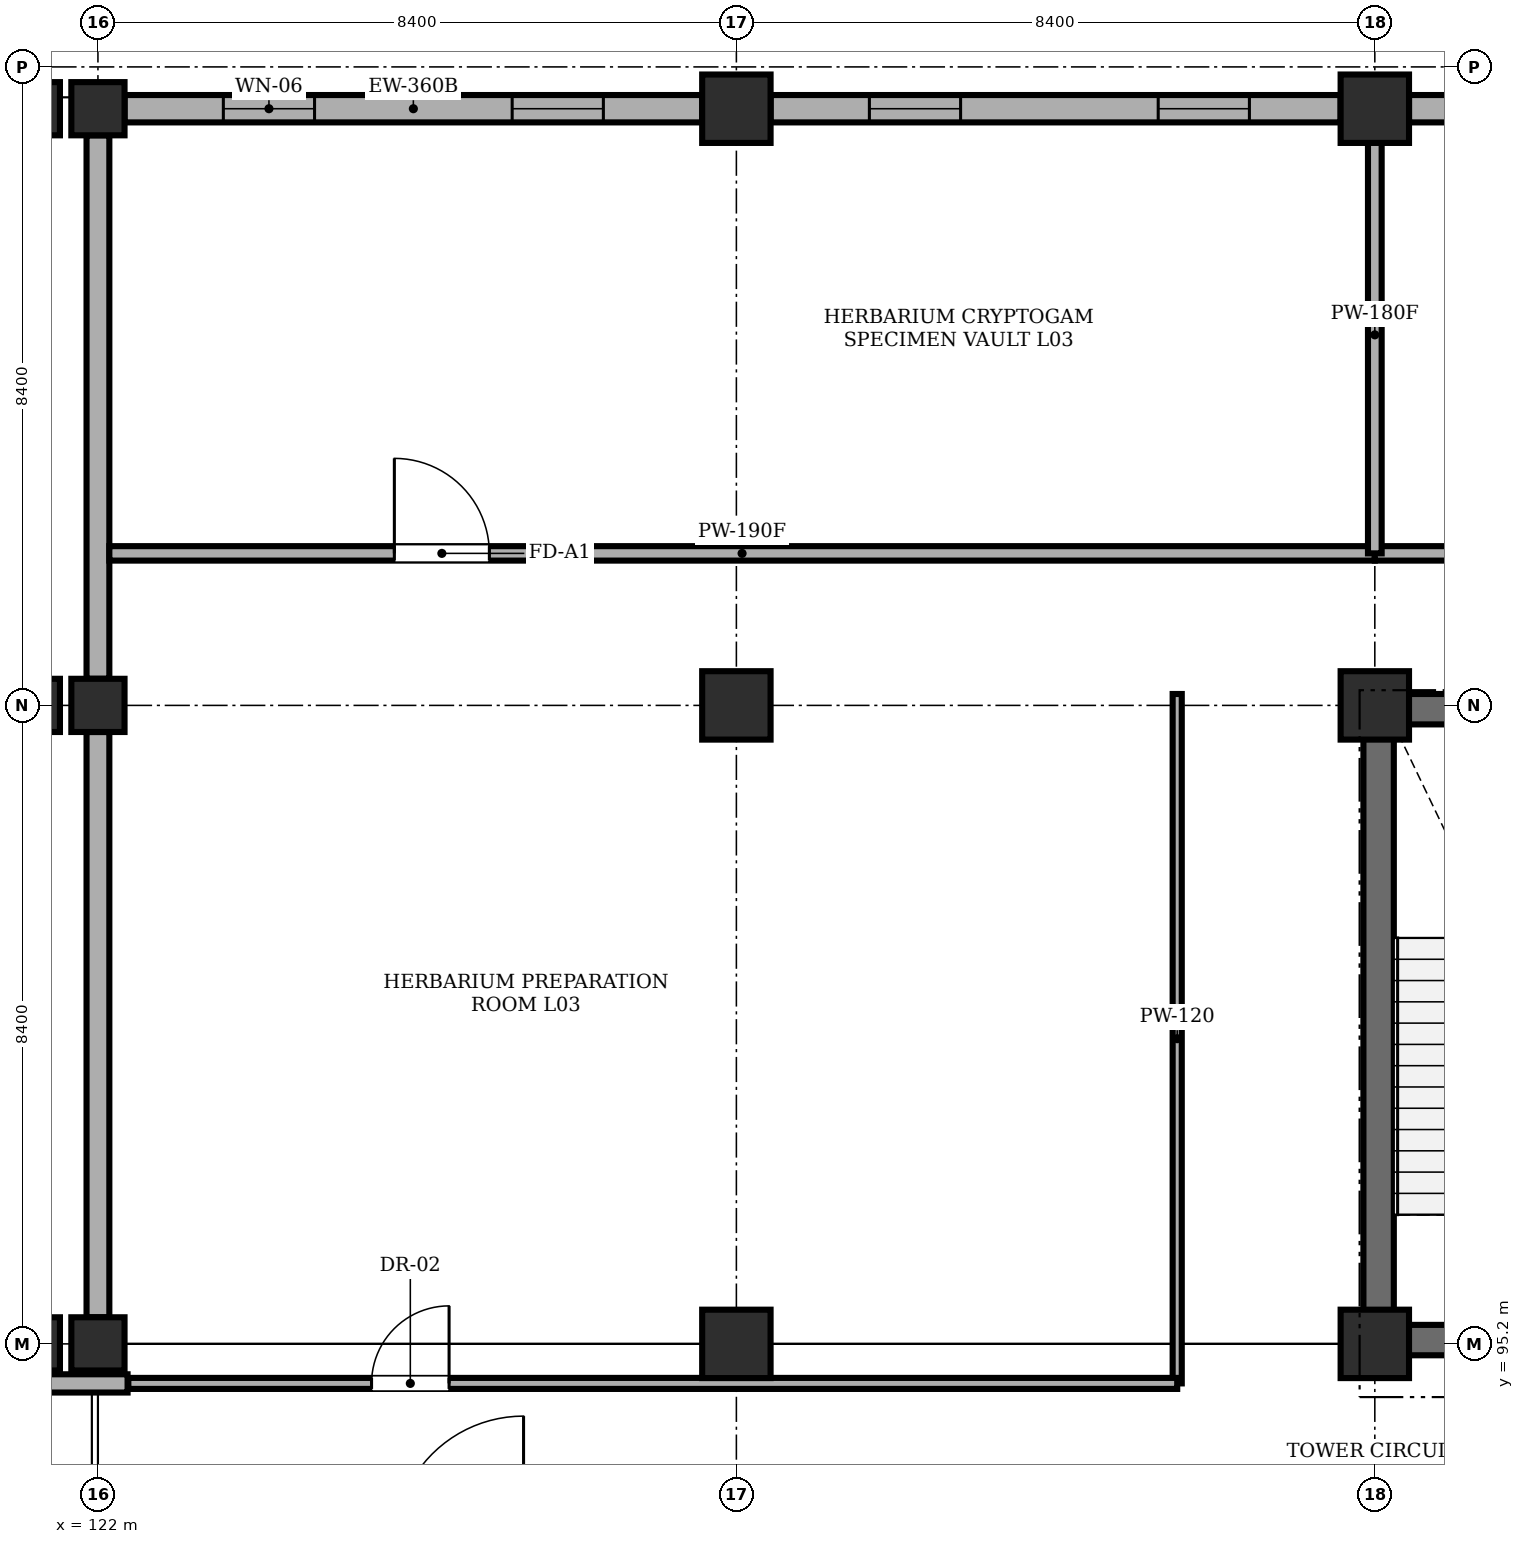
"""IFC4 building model, lengths in metres.
Left out: names, types, materials, properties, quantities, classifications, styles, units other than length and angle.
Written with IfcOpenShell. Run it as: python <this file> out.ifc"""

import sys

from ifc_helpers import new_model, si_unit, direction, frame, frame_2d, origin, origin_2d, place, context, subcontext, project, spatial, rectangle, extrude, element, fill, save


model = new_model("IFC4")
c1 = context("Model", 3, precision=1e-05, world=origin(), true_north=direction((0.0, 1.0)))
c2 = subcontext(c1, "Body", "Model", "MODEL_VIEW")
j1 = project(units=[si_unit("LENGTHUNIT", "METRE"), si_unit("PLANEANGLEUNIT", "RADIAN")], contexts=[c1])
p1 = place(None, origin())
s1 = spatial("IfcSite", under=j1, at=p1, CompositionType="ELEMENT")
p2 = place(p1, origin())
s2 = spatial("IfcBuilding", under=s1, at=p2, CompositionType="ELEMENT")
p3 = place(p2, frame((0.0, 0.0, 10.2)))
s3 = spatial("IfcBuildingStorey", under=s2, at=p3, CompositionType="ELEMENT", Elevation=10.2)
for number, where, z_axis, x_axis in (
    (1, (121.15, 95.2, 0.0), (0.0, 0.0, 1.0), (1.0, 0.0, 0.0)),
    (2, (121.15, 103.6, 0.0), (0.0, 0.0, 1.0), (1.0, 0.0, 0.0)),
    (3, (121.15, 111.45, 0.0), (0.0, 0.0, 1.0), (1.0, 0.0, 0.0)),
    (4, (122.0, 95.2, 0.0), (0.0, 0.0, 1.0), (1.0, 0.0, 0.0)),
    (5, (122.0, 103.6, 0.0), (0.0, 0.0, 1.0), (1.0, 0.0, 0.0)),
    (6, (122.0, 111.45, 0.0), (0.0, 0.0, 1.0), (1.0, 0.0, 0.0)),
):
    element("IfcColumn", number, at=place(p3, frame(where, z_axis=z_axis, x_axis=x_axis)), inside=s3, PredefinedType="COLUMN", context=c2, shape_type="SweptSolid", body=[
        extrude(rectangle(XDim=0.7, YDim=0.7, at=origin_2d()), origin(), (0.0, 0.0, 1.0), 4.26),
    ])
for number, where, z_axis, x_axis in (
    (7, (130.4, 95.2, 0.0), (0.0, 0.0, 1.0), (1.0, 0.0, 0.0)),
    (8, (130.4, 103.6, 0.0), (0.0, 0.0, 1.0), (1.0, 0.0, 0.0)),
    (9, (130.4, 111.45, 0.0), (0.0, 0.0, 1.0), (1.0, 0.0, 0.0)),
    (10, (138.8, 95.2, 0.0), (0.0, 0.0, 1.0), (1.0, 0.0, 0.0)),
    (11, (138.8, 103.6, 0.0), (0.0, 0.0, 1.0), (1.0, 0.0, 0.0)),
    (12, (138.8, 111.45, 0.0), (0.0, 0.0, 1.0), (1.0, 0.0, 0.0)),
):
    element("IfcColumn", number, at=place(p3, frame(where, z_axis=z_axis, x_axis=x_axis)), inside=s3, PredefinedType="COLUMN", context=c2, shape_type="SweptSolid", body=[
        extrude(rectangle(XDim=0.9, YDim=0.9, at=origin_2d()), origin(), (0.0, 0.0, 1.0), 4.26),
    ])
for number, where, z_axis, x_axis in (
    (13, (138.65, 95.25, 0.0), (0.0, 0.0, 1.0), (1.0, 0.0, 0.0)),
    (14, (138.65, 103.55, 0.0), (0.0, 0.0, 1.0), (1.0, 0.0, 0.0)),
):
    element("IfcWall", number, at=place(p3, frame(where, z_axis=z_axis, x_axis=x_axis)), inside=s3, PredefinedType="SHEAR", context=c2, shape_type="SweptSolid", body=[
        extrude(rectangle(XDim=3.9, YDim=0.4, at=frame_2d((1.95, 0.0))), origin(), (0.0, 0.0, 1.0), 4.26),
    ])
p4 = place(p3, frame((138.85, 95.45, 0.0), z_axis=(0.0, 0.0, 1.0), x_axis=(0.0, 1.0, 0.0)))
e15 = element("IfcWall", 15, at=p4, inside=s3, PredefinedType="SHEAR", context=c2, shape_type="SweptSolid", body=[
    extrude(rectangle(XDim=7.9, YDim=0.4, at=frame_2d((3.95, 0.0))), origin(), (0.0, 0.0, 1.0), 4.26),
])
p5 = place(p3, frame((122.35, 111.45, 0.0), z_axis=(0.0, 0.0, 1.0), x_axis=(1.0, 0.0, 0.0)))
e16 = element("IfcWall", 16, at=p5, inside=s3, PredefinedType="STANDARD", context=c2, shape_type="SweptSolid", body=[
    extrude(rectangle(XDim=7.6, YDim=0.36, at=frame_2d((3.8, 0.0))), origin(), (0.0, 0.0, 1.0), 3.51),
])
p6 = place(p5, frame((1.3, 0.0, 1.1)))
e17 = element("IfcOpeningElement", 17, at=p6, cuts=e16, PredefinedType="OPENING", context=c2, shape_type="SweptSolid", body=[
    extrude(rectangle(XDim=1.2, YDim=1.8, at=frame_2d((0.6, 0.9))), frame((0.0, 0.19, 0.0), z_axis=(0.0, -1.0, 0.0), x_axis=(1.0, 0.0, 0.0)), (0.0, 0.0, 1.0), 0.38),
])
p7 = place(p5, frame((5.1, 0.0, 1.1)))
e18 = element("IfcOpeningElement", 18, at=p7, cuts=e16, PredefinedType="OPENING", context=c2, shape_type="SweptSolid", body=[
    extrude(rectangle(XDim=1.2, YDim=1.8, at=frame_2d((0.6, 0.9))), frame((0.0, 0.19, 0.0), z_axis=(0.0, -1.0, 0.0), x_axis=(1.0, 0.0, 0.0)), (0.0, 0.0, 1.0), 0.38),
])
p8 = place(p3, frame((130.85, 111.45, 0.0), z_axis=(0.0, 0.0, 1.0), x_axis=(1.0, 0.0, 0.0)))
e19 = element("IfcWall", 19, at=p8, inside=s3, PredefinedType="STANDARD", context=c2, shape_type="SweptSolid", body=[
    extrude(rectangle(XDim=7.5, YDim=0.36, at=frame_2d((3.75, 0.0))), origin(), (0.0, 0.0, 1.0), 3.51),
])
p9 = place(p8, frame((1.3, 0.0, 1.1)))
e20 = element("IfcOpeningElement", 20, at=p9, cuts=e19, PredefinedType="OPENING", context=c2, shape_type="SweptSolid", body=[
    extrude(rectangle(XDim=1.2, YDim=1.8, at=frame_2d((0.6, 0.9))), frame((0.0, 0.19, 0.0), z_axis=(0.0, -1.0, 0.0), x_axis=(1.0, 0.0, 0.0)), (0.0, 0.0, 1.0), 0.38),
])
p10 = place(p8, frame((5.1, 0.0, 1.1)))
e21 = element("IfcOpeningElement", 21, at=p10, cuts=e19, PredefinedType="OPENING", context=c2, shape_type="SweptSolid", body=[
    extrude(rectangle(XDim=1.2, YDim=1.8, at=frame_2d((0.6, 0.9))), frame((0.0, 0.19, 0.0), z_axis=(0.0, -1.0, 0.0), x_axis=(1.0, 0.0, 0.0)), (0.0, 0.0, 1.0), 0.38),
])
p11 = place(p3, frame((139.25, 111.45, 0.0), z_axis=(0.0, 0.0, 1.0), x_axis=(1.0, 0.0, 0.0)))
e22 = element("IfcWall", 22, at=p11, inside=s3, PredefinedType="STANDARD", context=c2, shape_type="SweptSolid", body=[
    extrude(rectangle(XDim=7.5, YDim=0.36, at=frame_2d((3.75, 0.0))), origin(), (0.0, 0.0, 1.0), 3.51),
])
p12 = place(p11, frame((1.3, 0.0, 1.1)))
e23 = element("IfcOpeningElement", 23, at=p12, cuts=e22, PredefinedType="OPENING", context=c2, shape_type="SweptSolid", body=[
    extrude(rectangle(XDim=1.2, YDim=1.8, at=frame_2d((0.6, 0.9))), frame((0.0, 0.19, 0.0), z_axis=(0.0, -1.0, 0.0), x_axis=(1.0, 0.0, 0.0)), (0.0, 0.0, 1.0), 0.38),
])
p13 = place(p11, frame((5.1, 0.0, 1.1)))
e24 = element("IfcOpeningElement", 24, at=p13, cuts=e22, PredefinedType="OPENING", context=c2, shape_type="SweptSolid", body=[
    extrude(rectangle(XDim=1.2, YDim=1.8, at=frame_2d((0.6, 0.9))), frame((0.0, 0.19, 0.0), z_axis=(0.0, -1.0, 0.0), x_axis=(1.0, 0.0, 0.0)), (0.0, 0.0, 1.0), 0.38),
])
p14 = place(p3, frame((121.03, 94.68, 0.0), z_axis=(0.0, 0.0, 1.0), x_axis=(1.0, 0.0, 0.0)))
e25 = element("IfcWall", 25, at=p14, inside=s3, PredefinedType="STANDARD", context=c2, shape_type="SweptSolid", body=[
    extrude(rectangle(XDim=1.36, YDim=0.24, at=frame_2d((0.68, 0.0))), origin(), (0.0, 0.0, 1.0), 4.26),
])
p15 = place(p3, frame((122.0, 95.55, 0.0), z_axis=(0.0, 0.0, 1.0), x_axis=(0.0, 1.0, 0.0)))
e26 = element("IfcWall", 26, at=p15, inside=s3, PredefinedType="STANDARD", context=c2, shape_type="SweptSolid", body=[
    extrude(rectangle(XDim=7.7, YDim=0.3, at=frame_2d((3.85, 0.0))), origin(), (0.0, 0.0, 1.0), 3.51),
])
p16 = place(p3, frame((122.0, 103.95, 0.0), z_axis=(0.0, 0.0, 1.0), x_axis=(0.0, 1.0, 0.0)))
e27 = element("IfcWall", 27, at=p16, inside=s3, PredefinedType="STANDARD", context=c2, shape_type="SweptSolid", body=[
    extrude(rectangle(XDim=7.15, YDim=0.3, at=frame_2d((3.575, 0.0))), origin(), (0.0, 0.0, 1.0), 3.51),
])
p17 = place(p3, frame((136.2, 94.68, 0.0), z_axis=(0.0, 0.0, 1.0), x_axis=(0.0, 1.0, 0.0)))
e28 = element("IfcWall", 28, at=p17, inside=s3, PredefinedType="PARTITIONING", context=c2, shape_type="SweptSolid", body=[
    extrude(rectangle(XDim=9.07, YDim=0.12, at=frame_2d((4.535, 0.0))), origin(), (0.0, 0.0, 1.0), 4.26),
])
p18 = place(p3, frame((122.4, 94.68, 0.0), z_axis=(0.0, 0.0, 1.0), x_axis=(1.0, 0.0, 0.0)))
e29 = element("IfcWall", 29, at=p18, inside=s3, PredefinedType="PARTITIONING", context=c2, shape_type="SweptSolid", body=[
    extrude(rectangle(XDim=13.8, YDim=0.145, at=frame_2d((6.9, 0.0))), origin(), (0.0, 0.0, 1.0), 4.26),
])
p19 = place(p18, frame((3.2, 0.0, 0.0)))
e30 = element("IfcOpeningElement", 30, at=p19, cuts=e29, PredefinedType="OPENING", context=c2, shape_type="SweptSolid", body=[
    extrude(rectangle(XDim=1.02, YDim=2.15, at=frame_2d((0.51, 1.075))), frame((0.0, 0.083, 0.0), z_axis=(0.0, -1.0, 0.0), x_axis=(1.0, 0.0, 0.0)), (0.0, 0.0, 1.0), 0.165),
])
p20 = place(p3, frame((122.15, 105.6, 0.0), z_axis=(0.0, 0.0, 1.0), x_axis=(1.0, 0.0, 0.0)))
e31 = element("IfcWall", 31, at=p20, inside=s3, PredefinedType="SOLIDWALL", context=c2, shape_type="SweptSolid", body=[
    extrude(rectangle(XDim=16.65, YDim=0.19, at=frame_2d((8.325, 0.0))), origin(), (0.0, 0.0, 1.0), 4.26),
])
p21 = place(p20, frame((3.75, 0.0, 0.0)))
e32 = element("IfcOpeningElement", 32, at=p21, cuts=e31, PredefinedType="OPENING", context=c2, shape_type="SweptSolid", body=[
    extrude(rectangle(XDim=1.25, YDim=2.2, at=frame_2d((0.625, 1.1))), frame((0.0, 0.105, 0.0), z_axis=(0.0, -1.0, 0.0), x_axis=(1.0, 0.0, 0.0)), (0.0, 0.0, 1.0), 0.21),
])
p22 = place(p3, frame((138.8, 105.6, 0.0), z_axis=(0.0, 0.0, 1.0), x_axis=(1.0, 0.0, 0.0)))
e33 = element("IfcWall", 33, at=p22, inside=s3, PredefinedType="SOLIDWALL", context=c2, shape_type="SweptSolid", body=[
    extrude(rectangle(XDim=24.55, YDim=0.19, at=frame_2d((12.275, 0.0))), origin(), (0.0, 0.0, 1.0), 4.26),
])
p23 = place(p22, frame((3.4, 0.0, 0.0)))
e34 = element("IfcOpeningElement", 34, at=p23, cuts=e33, PredefinedType="OPENING", context=c2, shape_type="SweptSolid", body=[
    extrude(rectangle(XDim=1.25, YDim=2.2, at=frame_2d((0.625, 1.1))), frame((0.0, 0.105, 0.0), z_axis=(0.0, -1.0, 0.0), x_axis=(1.0, 0.0, 0.0)), (0.0, 0.0, 1.0), 0.21),
])
p24 = place(p3, frame((138.8, 105.6, 0.0), z_axis=(0.0, 0.0, 1.0), x_axis=(0.0, 1.0, 0.0)))
e35 = element("IfcWall", 35, at=p24, inside=s3, PredefinedType="STANDARD", context=c2, shape_type="SweptSolid", body=[
    extrude(rectangle(XDim=5.75, YDim=0.18, at=frame_2d((2.875, 0.0))), origin(), (0.0, 0.0, 1.0), 3.51),
])
p25 = place(p6, origin())
e36 = element("IfcWindow", 36, at=p25, inside=s3, PartitioningType="SINGLE_PANEL", PredefinedType="WINDOW", context=c2, shape_type="SweptSolid", body=[
    extrude(rectangle(XDim=1.2, YDim=1.8, at=frame_2d((0.6, 0.9))), frame((0.0, 0.03, 0.0), z_axis=(0.0, -1.0, 0.0), x_axis=(1.0, 0.0, 0.0)), (0.0, 0.0, 1.0), 0.06),
])
fill(e17, e36)
p26 = place(p7, origin())
e37 = element("IfcWindow", 37, at=p26, inside=s3, PartitioningType="SINGLE_PANEL", PredefinedType="WINDOW", context=c2, shape_type="SweptSolid", body=[
    extrude(rectangle(XDim=1.2, YDim=1.8, at=frame_2d((0.6, 0.9))), frame((0.0, 0.03, 0.0), z_axis=(0.0, -1.0, 0.0), x_axis=(1.0, 0.0, 0.0)), (0.0, 0.0, 1.0), 0.06),
])
fill(e18, e37)
p27 = place(p9, origin())
e38 = element("IfcWindow", 38, at=p27, inside=s3, PartitioningType="SINGLE_PANEL", PredefinedType="WINDOW", context=c2, shape_type="SweptSolid", body=[
    extrude(rectangle(XDim=1.2, YDim=1.8, at=frame_2d((0.6, 0.9))), frame((0.0, 0.03, 0.0), z_axis=(0.0, -1.0, 0.0), x_axis=(1.0, 0.0, 0.0)), (0.0, 0.0, 1.0), 0.06),
])
fill(e20, e38)
p28 = place(p10, origin())
e39 = element("IfcWindow", 39, at=p28, inside=s3, PartitioningType="SINGLE_PANEL", PredefinedType="WINDOW", context=c2, shape_type="SweptSolid", body=[
    extrude(rectangle(XDim=1.2, YDim=1.8, at=frame_2d((0.6, 0.9))), frame((0.0, 0.03, 0.0), z_axis=(0.0, -1.0, 0.0), x_axis=(1.0, 0.0, 0.0)), (0.0, 0.0, 1.0), 0.06),
])
fill(e21, e39)
p29 = place(p19, origin())
e40 = element("IfcDoor", 40, at=p29, inside=s3, OperationType="SINGLE_SWING_RIGHT", PredefinedType="DOOR", context=c2, shape_type="SweptSolid", body=[
    extrude(rectangle(XDim=1.02, YDim=2.15, at=frame_2d((0.51, 1.075))), frame((0.0, 0.025, 0.0), z_axis=(0.0, -1.0, 0.0), x_axis=(1.0, 0.0, 0.0)), (0.0, 0.0, 1.0), 0.05),
])
fill(e30, e40)
p30 = place(p21, origin())
e41 = element("IfcDoor", 41, at=p30, inside=s3, OperationType="SINGLE_SWING_LEFT", PredefinedType="DOOR", context=c2, shape_type="SweptSolid", body=[
    extrude(rectangle(XDim=1.25, YDim=2.2, at=frame_2d((0.625, 1.1))), frame((0.0, 0.025, 0.0), z_axis=(0.0, -1.0, 0.0), x_axis=(1.0, 0.0, 0.0)), (0.0, 0.0, 1.0), 0.05),
])
fill(e32, e41)
save(model, sys.argv[1])
